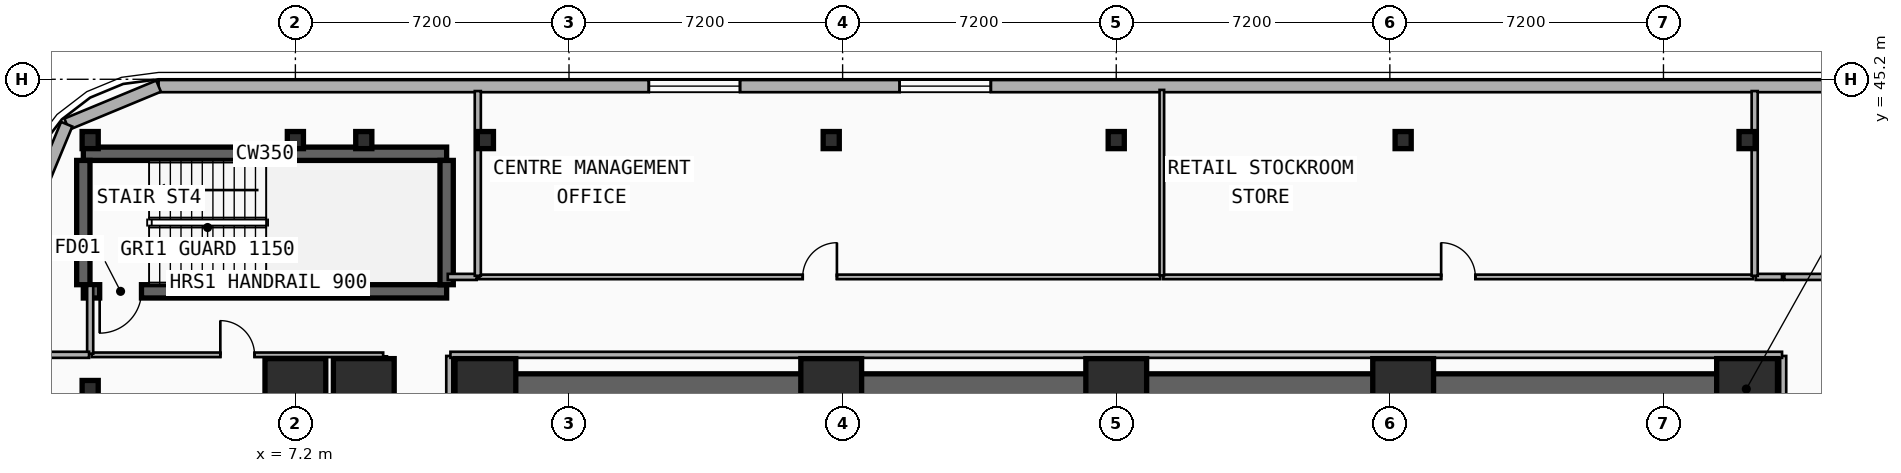
"""IFC4 building model, lengths in metres.
Left out: names, types, materials, properties, quantities, classifications, styles, units other than length and angle.
Written with IfcOpenShell. Run it as: python <this file> out.ifc"""

import sys

from ifc_helpers import new_model, si_unit, direction, frame, frame_2d, origin, origin_2d, place, context, subcontext, project, spatial, rectangle, i_section, extrude, element, fill, save


model = new_model("IFC4")
c1 = context("Model", 3, precision=1e-05, world=origin(), true_north=direction((0.0, 1.0)))
c2 = subcontext(c1, "Body", "Model", "MODEL_VIEW")
j1 = project(units=[si_unit("LENGTHUNIT", "METRE"), si_unit("PLANEANGLEUNIT", "RADIAN")], contexts=[c1])
p1 = place(None, origin())
s1 = spatial("IfcSite", under=j1, at=p1, CompositionType="ELEMENT")
p2 = place(p1, origin())
s2 = spatial("IfcBuilding", under=s1, at=p2, CompositionType="ELEMENT")
p3 = place(p2, frame((0.0, 0.0, 10.4)))
s3 = spatial("IfcBuildingStorey", under=s2, at=p3, CompositionType="ELEMENT", Elevation=10.4)
p4 = place(p3, frame((12.15, 37.05, 0.0), z_axis=(0.0, 0.0, 1.0), x_axis=(1.0, 0.0, 0.0)))
e1 = element("IfcWall", 1, at=p4, inside=s3, PredefinedType="SHEAR", context=c2, shape_type="SweptSolid", body=[
    extrude(rectangle(XDim=33.23, YDim=0.8, at=frame_2d((16.615, 0.0))), origin(), (0.0, 0.0, 1.0), 4.5),
])
p5 = place(p3, frame((1.62, 43.24, 0.0), z_axis=(0.0, 0.0, 1.0), x_axis=(1.0, 0.0, 0.0)))
e2 = element("IfcWall", 2, at=p5, inside=s3, PredefinedType="SHEAR", context=c2, shape_type="SweptSolid", body=[
    extrude(rectangle(XDim=9.56, YDim=0.35, at=frame_2d((4.78, 0.0))), origin(), (0.0, 0.0, 1.0), 4.5),
])
p6 = place(p3, frame((11.18, 39.62, 0.0), z_axis=(0.0, 0.0, 1.0), x_axis=(-1.0, 0.0, 0.0)))
e3 = element("IfcWall", 3, at=p6, inside=s3, PredefinedType="SHEAR", context=c2, shape_type="SweptSolid", body=[
    extrude(rectangle(XDim=9.56, YDim=0.35, at=frame_2d((4.78, 0.0))), origin(), (0.0, 0.0, 1.0), 4.5),
])
p7 = place(p6, frame((8.03, 0.0, 0.0)))
e4 = element("IfcOpeningElement", 4, at=p7, cuts=e3, PredefinedType="OPENING", context=c2, shape_type="SweptSolid", body=[
    extrude(rectangle(XDim=1.1, YDim=2.15, at=frame_2d((0.55, 1.075))), frame((0.0, 0.185, 0.0), z_axis=(0.0, -1.0, 0.0), x_axis=(1.0, 0.0, 0.0)), (0.0, 0.0, 1.0), 0.37),
])
for number, where, z_axis, x_axis in (
    (5, (1.62, 39.795, 0.0), (0.0, 0.0, 1.0), (0.0, 1.0, 0.0)),
    (6, (11.18, 39.795, 0.0), (0.0, 0.0, 1.0), (0.0, 1.0, 0.0)),
):
    element("IfcWall", number, at=place(p3, frame(where, z_axis=z_axis, x_axis=x_axis)), inside=s3, PredefinedType="SHEAR", context=c2, shape_type="SweptSolid", body=[
        extrude(rectangle(XDim=3.27, YDim=0.35, at=frame_2d((1.635, 0.0))), origin(), (0.0, 0.0, 1.0), 4.5),
    ])
for number, where, z_axis, x_axis in (
    (7, (12.2, 37.05, 0.0), (0.0, 0.0, 1.0), (1.0, 0.0, 0.0)),
    (8, (21.3, 37.05, 0.0), (0.0, 0.0, 1.0), (1.0, 0.0, 0.0)),
    (9, (28.8, 37.05, 0.0), (0.0, 0.0, 1.0), (1.0, 0.0, 0.0)),
    (10, (36.35, 37.05, 0.0), (0.0, 0.0, 1.0), (1.0, 0.0, 0.0)),
    (11, (45.4, 37.05, 0.0), (0.0, 0.0, 1.0), (1.0, 0.0, 0.0)),
):
    element("IfcColumn", number, at=place(p3, frame(where, z_axis=z_axis, x_axis=x_axis)), inside=s3, PredefinedType="COLUMN", context=c2, shape_type="SweptSolid", body=[
        extrude(rectangle(XDim=1.6, YDim=1.6, at=origin_2d()), origin(), (0.0, 0.0, 1.0), 4.5),
    ])
for number, where, z_axis, x_axis in (
    (12, (1.8, 37.05, 0.0), (0.0, 0.0, 1.0), (1.0, 0.0, 0.0)),
    (13, (1.8, 43.6, 0.0), (0.0, 0.0, 1.0), (1.0, 0.0, 0.0)),
):
    element("IfcColumn", number, at=place(p3, frame(where, z_axis=z_axis, x_axis=x_axis)), inside=s3, PredefinedType="COLUMN", context=c2, shape_type="SweptSolid", body=[
        extrude(i_section(OverallWidth=0.424, OverallDepth=0.45, WebThickness=0.041, FlangeThickness=0.065, FilletRadius=0.015, at=origin_2d()), origin(), (0.0, 0.0, 1.0), 4.5),
    ])
p8 = place(p3, frame((7.2, 37.05, 0.0), z_axis=(0.0, 0.0, 1.0), x_axis=(1.0, 0.0, 0.0)))
e14 = element("IfcColumn", 14, at=p8, inside=s3, PredefinedType="COLUMN", context=c2, shape_type="SweptSolid", body=[
    extrude(rectangle(XDim=1.6, YDim=1.6, at=origin_2d()), origin(), (0.0, 0.0, 1.0), 4.5),
])
p9 = place(p3, frame((7.2, 43.6, 0.0), z_axis=(0.0, 0.0, 1.0), x_axis=(1.0, 0.0, 0.0)))
e15 = element("IfcColumn", 15, at=p9, inside=s3, PredefinedType="COLUMN", context=c2, shape_type="SweptSolid", body=[
    extrude(i_section(OverallWidth=0.424, OverallDepth=0.45, WebThickness=0.041, FlangeThickness=0.065, FilletRadius=0.015, at=origin_2d()), origin(), (0.0, 0.0, 1.0), 4.5),
])
p10 = place(p3, frame((9.0, 37.05, 0.0), z_axis=(0.0, 0.0, 1.0), x_axis=(1.0, 0.0, 0.0)))
e16 = element("IfcColumn", 16, at=p10, inside=s3, PredefinedType="COLUMN", context=c2, shape_type="SweptSolid", body=[
    extrude(rectangle(XDim=1.6, YDim=1.6, at=origin_2d()), origin(), (0.0, 0.0, 1.0), 4.5),
])
for number, where, z_axis, x_axis in (
    (17, (9.0, 43.6, 0.0), (0.0, 0.0, 1.0), (1.0, 0.0, 0.0)),
    (18, (12.2, 43.6, 0.0), (0.0, 0.0, 1.0), (1.0, 0.0, 0.0)),
    (19, (21.3, 43.6, 0.0), (0.0, 0.0, 1.0), (1.0, 0.0, 0.0)),
    (20, (28.8, 43.6, 0.0), (0.0, 0.0, 1.0), (1.0, 0.0, 0.0)),
    (21, (36.35, 43.6, 0.0), (0.0, 0.0, 1.0), (1.0, 0.0, 0.0)),
    (22, (45.4, 43.6, 0.0), (0.0, 0.0, 1.0), (1.0, 0.0, 0.0)),
):
    element("IfcColumn", number, at=place(p3, frame(where, z_axis=z_axis, x_axis=x_axis)), inside=s3, PredefinedType="COLUMN", context=c2, shape_type="SweptSolid", body=[
        extrude(i_section(OverallWidth=0.424, OverallDepth=0.45, WebThickness=0.041, FlangeThickness=0.065, FilletRadius=0.015, at=origin_2d()), origin(), (0.0, 0.0, 1.0), 4.5),
    ])
p11 = place(p3, frame((3.6, 45.02, 0.0), z_axis=(0.0, 0.0, 1.0), x_axis=(1.0, 0.0, 0.0)))
e23 = element("IfcWall", 23, at=p11, inside=s3, PredefinedType="SOLIDWALL", context=c2, shape_type="SweptSolid", body=[
    extrude(rectangle(XDim=50.4, YDim=0.32, at=frame_2d((25.2, 0.0))), origin(), (0.0, 0.0, 1.0), 4.2),
])
p12 = place(p11, frame((12.9, 0.0, 0.9)))
e24 = element("IfcOpeningElement", 24, at=p12, cuts=e23, PredefinedType="OPENING", context=c2, shape_type="SweptSolid", body=[
    extrude(rectangle(XDim=2.4, YDim=1.8, at=frame_2d((1.2, 0.9))), frame((0.0, 0.17, 0.0), z_axis=(0.0, -1.0, 0.0), x_axis=(1.0, 0.0, 0.0)), (0.0, 0.0, 1.0), 0.34),
])
p13 = place(p11, frame((19.5, 0.0, 0.9)))
e25 = element("IfcOpeningElement", 25, at=p13, cuts=e23, PredefinedType="OPENING", context=c2, shape_type="SweptSolid", body=[
    extrude(rectangle(XDim=2.4, YDim=1.8, at=frame_2d((1.2, 0.9))), frame((0.0, 0.17, 0.0), z_axis=(0.0, -1.0, 0.0), x_axis=(1.0, 0.0, 0.0)), (0.0, 0.0, 1.0), 0.34),
])
p14 = place(p3, frame((1.182, 44.018, 0.0), z_axis=(0.0, 0.0, 1.0), x_axis=(0.923886112352, 0.382667546838, 0.0)))
e26 = element("IfcWall", 26, at=p14, inside=s3, PredefinedType="SOLIDWALL", context=c2, shape_type="SweptSolid", body=[
    extrude(rectangle(XDim=2.618, YDim=0.32, at=frame_2d((1.309, 0.0))), origin(), (0.0, 0.0, 1.0), 4.2),
])
p15 = place(p3, frame((0.18, 41.6, 0.0), z_axis=(0.0, 0.0, 1.0), x_axis=(0.382700522567, 0.923872453333, 0.0)))
e27 = element("IfcWall", 27, at=p15, inside=s3, PredefinedType="SOLIDWALL", context=c2, shape_type="SweptSolid", body=[
    extrude(rectangle(XDim=2.617, YDim=0.32, at=frame_2d((1.309, 0.0))), origin(), (0.0, 0.0, 1.0), 4.2),
])
p16 = place(p3, frame((9.55, 27.64, 0.0), z_axis=(0.0, 0.0, 1.0), x_axis=(0.0, 1.0, 0.0)))
e28 = element("IfcWall", 28, at=p16, inside=s3, PredefinedType="PARTITIONING", context=c2, shape_type="SweptSolid", body=[
    extrude(rectangle(XDim=10.27, YDim=0.12, at=frame_2d((5.135, 0.0))), origin(), (0.0, 0.0, 1.0), 4.2),
])
p17 = place(p16, frame((4.685, 0.0, 0.0)))
e29 = element("IfcOpeningElement", 29, at=p17, cuts=e28, PredefinedType="OPENING", context=c2, shape_type="SweptSolid", body=[
    extrude(rectangle(XDim=0.9, YDim=2.1, at=frame_2d((0.45, 1.05))), frame((0.0, 0.07, 0.0), z_axis=(0.0, -1.0, 0.0), x_axis=(1.0, 0.0, 0.0)), (0.0, 0.0, 1.0), 0.14),
])
p18 = place(p3, frame((1.84, 37.95, 0.0), z_axis=(0.0, 0.0, 1.0), x_axis=(1.0, 0.0, 0.0)))
e30 = element("IfcWall", 30, at=p18, inside=s3, PredefinedType="PARTITIONING", context=c2, shape_type="SweptSolid", body=[
    extrude(rectangle(XDim=7.67, YDim=0.12, at=frame_2d((3.835, 0.0))), origin(), (0.0, 0.0, 1.0), 4.2),
])
p19 = place(p18, frame((3.385, 0.0, 0.0)))
e31 = element("IfcOpeningElement", 31, at=p19, cuts=e30, PredefinedType="OPENING", context=c2, shape_type="SweptSolid", body=[
    extrude(rectangle(XDim=0.9, YDim=2.1, at=frame_2d((0.45, 1.05))), frame((0.0, 0.07, 0.0), z_axis=(0.0, -1.0, 0.0), x_axis=(1.0, 0.0, 0.0)), (0.0, 0.0, 1.0), 0.14),
])
p20 = place(p3, frame((12.04, 40.0, 0.0), z_axis=(0.0, 0.0, 1.0), x_axis=(1.0, 0.0, 0.0)))
e32 = element("IfcWall", 32, at=p20, inside=s3, PredefinedType="PARTITIONING", context=c2, shape_type="SweptSolid", body=[
    extrude(rectangle(XDim=17.92, YDim=0.12, at=frame_2d((8.96, 0.0))), origin(), (0.0, 0.0, 1.0), 3.53),
])
p21 = place(p20, frame((8.51, 0.0, 0.0)))
e33 = element("IfcOpeningElement", 33, at=p21, cuts=e32, PredefinedType="OPENING", context=c2, shape_type="SweptSolid", body=[
    extrude(rectangle(XDim=0.9, YDim=2.1, at=frame_2d((0.45, 1.05))), frame((0.0, 0.07, 0.0), z_axis=(0.0, -1.0, 0.0), x_axis=(1.0, 0.0, 0.0)), (0.0, 0.0, 1.0), 0.14),
])
p22 = place(p3, frame((30.04, 40.0, 0.0), z_axis=(0.0, 0.0, 1.0), x_axis=(1.0, 0.0, 0.0)))
e34 = element("IfcWall", 34, at=p22, inside=s3, PredefinedType="PARTITIONING", context=c2, shape_type="SweptSolid", body=[
    extrude(rectangle(XDim=15.52, YDim=0.12, at=frame_2d((7.76, 0.0))), origin(), (0.0, 0.0, 1.0), 3.53),
])
p23 = place(p22, frame((7.31, 0.0, 0.0)))
e35 = element("IfcOpeningElement", 35, at=p23, cuts=e34, PredefinedType="OPENING", context=c2, shape_type="SweptSolid", body=[
    extrude(rectangle(XDim=0.9, YDim=2.1, at=frame_2d((0.45, 1.05))), frame((0.0, 0.07, 0.0), z_axis=(0.0, -1.0, 0.0), x_axis=(1.0, 0.0, 0.0)), (0.0, 0.0, 1.0), 0.14),
])
p24 = place(p3, frame((30.0, 40.04, 0.0), z_axis=(0.0, 0.0, 1.0), x_axis=(0.0, 1.0, 0.0)))
e36 = element("IfcWall", 36, at=p24, inside=s3, PredefinedType="PARTITIONING", context=c2, shape_type="SweptSolid", body=[
    extrude(rectangle(XDim=4.88, YDim=0.12, at=frame_2d((2.44, 0.0))), origin(), (0.0, 0.0, 1.0), 3.53),
])
p25 = place(p3, frame((11.25, 27.63, 0.0), z_axis=(0.0, 0.0, 1.0), x_axis=(0.0, 1.0, 0.0)))
e37 = element("IfcWall", 37, at=p25, inside=s3, PredefinedType="PARTITIONING", context=c2, shape_type="SweptSolid", body=[
    extrude(rectangle(XDim=10.29, YDim=0.16, at=frame_2d((5.145, 0.0))), origin(), (0.0, 0.0, 1.0), 4.2),
])
p26 = place(p3, frame((46.38, 40.0, 0.0), z_axis=(0.0, 0.0, 1.0), x_axis=(1.0, 0.0, 0.0)))
e38 = element("IfcWall", 38, at=p26, inside=s3, PredefinedType="PARTITIONING", context=c2, shape_type="SweptSolid", body=[
    extrude(rectangle(XDim=1.64, YDim=0.16, at=frame_2d((0.82, 0.0))), origin(), (0.0, 0.0, 1.0), 4.2),
])
p27 = place(p3, frame((46.35, 27.63, 0.0), z_axis=(0.0, 0.0, 1.0), x_axis=(0.0, 1.0, 0.0)))
e39 = element("IfcWall", 39, at=p27, inside=s3, PredefinedType="PARTITIONING", context=c2, shape_type="SweptSolid", body=[
    extrude(rectangle(XDim=10.29, YDim=0.16, at=frame_2d((5.145, 0.0))), origin(), (0.0, 0.0, 1.0), 4.2),
])
p28 = place(p3, frame((11.28, 37.95, 0.0), z_axis=(0.0, 0.0, 1.0), x_axis=(1.0, 0.0, 0.0)))
e40 = element("IfcWall", 40, at=p28, inside=s3, PredefinedType="PARTITIONING", context=c2, shape_type="SweptSolid", body=[
    extrude(rectangle(XDim=35.04, YDim=0.16, at=frame_2d((17.52, 0.0))), origin(), (0.0, 0.0, 1.0), 3.53),
])
p29 = place(p3, frame((11.21, 40.0, 0.0), z_axis=(0.0, 0.0, 1.0), x_axis=(1.0, 0.0, 0.0)))
e41 = element("IfcWall", 41, at=p29, inside=s3, PredefinedType="PARTITIONING", context=c2, shape_type="SweptSolid", body=[
    extrude(rectangle(XDim=0.76, YDim=0.16, at=frame_2d((0.38, 0.0))), origin(), (0.0, 0.0, 1.0), 3.53),
])
p30 = place(p3, frame((45.63, 40.0, 0.0), z_axis=(0.0, 0.0, 1.0), x_axis=(1.0, 0.0, 0.0)))
e42 = element("IfcWall", 42, at=p30, inside=s3, PredefinedType="PARTITIONING", context=c2, shape_type="SweptSolid", body=[
    extrude(rectangle(XDim=0.69, YDim=0.16, at=frame_2d((0.345, 0.0))), origin(), (0.0, 0.0, 1.0), 3.53),
])
p31 = place(p3, frame((1.8, 37.98, 0.0), z_axis=(0.0, 0.0, 1.0), x_axis=(0.0, 1.0, 0.0)))
e43 = element("IfcWall", 43, at=p31, inside=s3, PredefinedType="PARTITIONING", context=c2, shape_type="SweptSolid", body=[
    extrude(rectangle(XDim=1.785, YDim=0.16, at=frame_2d((0.893, 0.0))), origin(), (0.0, 0.0, 1.0), 4.2),
])
p32 = place(p3, frame((0.31, 37.95, 0.0), z_axis=(0.0, 0.0, 1.0), x_axis=(1.0, 0.0, 0.0)))
e44 = element("IfcWall", 44, at=p32, inside=s3, PredefinedType="PARTITIONING", context=c2, shape_type="SweptSolid", body=[
    extrude(rectangle(XDim=1.46, YDim=0.16, at=frame_2d((0.73, 0.0))), origin(), (0.0, 0.0, 1.0), 4.2),
])
for number, where, z_axis, x_axis in (
    (45, (12.0, 40.03, 0.0), (0.0, 0.0, 1.0), (0.0, 1.0, 0.0)),
    (46, (45.6, 40.03, 0.0), (0.0, 0.0, 1.0), (0.0, 1.0, 0.0)),
):
    element("IfcWall", number, at=place(p3, frame(where, z_axis=z_axis, x_axis=x_axis)), inside=s3, PredefinedType="PARTITIONING", context=c2, shape_type="SweptSolid", body=[
        extrude(rectangle(XDim=4.86, YDim=0.16, at=frame_2d((2.43, 0.0))), origin(), (0.0, 0.0, 1.0), 3.53),
    ])
p33 = place(p12, origin())
e47 = element("IfcWindow", 47, at=p33, inside=s3, PartitioningType="SINGLE_PANEL", PredefinedType="WINDOW", context=c2, shape_type="SweptSolid", body=[
    extrude(rectangle(XDim=2.4, YDim=1.8, at=frame_2d((1.2, 0.9))), frame((0.0, 0.03, 0.0), z_axis=(0.0, -1.0, 0.0), x_axis=(1.0, 0.0, 0.0)), (0.0, 0.0, 1.0), 0.06),
])
fill(e24, e47)
p34 = place(p13, origin())
e48 = element("IfcWindow", 48, at=p34, inside=s3, PartitioningType="SINGLE_PANEL", PredefinedType="WINDOW", context=c2, shape_type="SweptSolid", body=[
    extrude(rectangle(XDim=2.4, YDim=1.8, at=frame_2d((1.2, 0.9))), frame((0.0, 0.03, 0.0), z_axis=(0.0, -1.0, 0.0), x_axis=(1.0, 0.0, 0.0)), (0.0, 0.0, 1.0), 0.06),
])
fill(e25, e48)
p35 = place(p7, origin())
e49 = element("IfcDoor", 49, at=p35, inside=s3, OperationType="SINGLE_SWING_RIGHT", PredefinedType="DOOR", context=c2, shape_type="SweptSolid", body=[
    extrude(rectangle(XDim=1.1, YDim=2.15, at=frame_2d((0.55, 1.075))), frame((0.0, 0.025, 0.0), z_axis=(0.0, -1.0, 0.0), x_axis=(1.0, 0.0, 0.0)), (0.0, 0.0, 1.0), 0.05),
])
fill(e4, e49)
p36 = place(p19, origin())
e50 = element("IfcDoor", 50, at=p36, inside=s3, OperationType="SINGLE_SWING_LEFT", PredefinedType="DOOR", context=c2, shape_type="SweptSolid", body=[
    extrude(rectangle(XDim=0.9, YDim=2.1, at=frame_2d((0.45, 1.05))), frame((0.0, 0.025, 0.0), z_axis=(0.0, -1.0, 0.0), x_axis=(1.0, 0.0, 0.0)), (0.0, 0.0, 1.0), 0.05),
])
fill(e31, e50)
p37 = place(p21, origin())
e51 = element("IfcDoor", 51, at=p37, inside=s3, OperationType="SINGLE_SWING_RIGHT", PredefinedType="DOOR", context=c2, shape_type="SweptSolid", body=[
    extrude(rectangle(XDim=0.9, YDim=2.1, at=frame_2d((0.45, 1.05))), frame((0.0, 0.025, 0.0), z_axis=(0.0, -1.0, 0.0), x_axis=(1.0, 0.0, 0.0)), (0.0, 0.0, 1.0), 0.05),
])
fill(e33, e51)
p38 = place(p23, origin())
e52 = element("IfcDoor", 52, at=p38, inside=s3, OperationType="SINGLE_SWING_LEFT", PredefinedType="DOOR", context=c2, shape_type="SweptSolid", body=[
    extrude(rectangle(XDim=0.9, YDim=2.1, at=frame_2d((0.45, 1.05))), frame((0.0, 0.025, 0.0), z_axis=(0.0, -1.0, 0.0), x_axis=(1.0, 0.0, 0.0)), (0.0, 0.0, 1.0), 0.05),
])
fill(e35, e52)
save(model, sys.argv[1])
